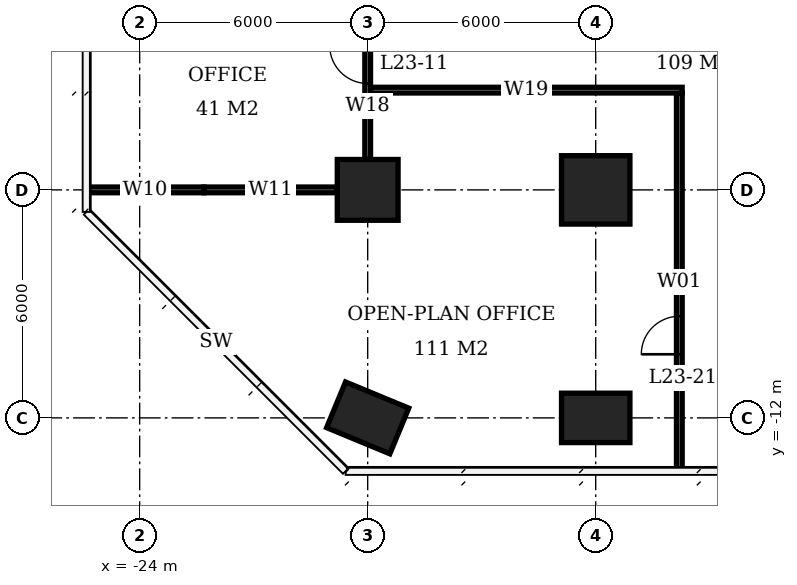
"""IFC4 building model, lengths in metres.
Left out: names, types, materials, properties, quantities, classifications, styles, units other than length and angle.
Written with IfcOpenShell. Run it as: python <this file> out.ifc"""

import sys

from ifc_helpers import new_model, si_unit, direction, frame, frame_2d, origin, origin_2d, place, context, subcontext, project, spatial, rectangle, extrude, element, fill, save


model = new_model("IFC4")
c1 = context("Model", 3, precision=1e-05, world=origin(), true_north=direction((0.0, 1.0)))
c2 = subcontext(c1, "Body", "Model", "MODEL_VIEW")
j1 = project(units=[si_unit("LENGTHUNIT", "METRE"), si_unit("PLANEANGLEUNIT", "RADIAN")], contexts=[c1])
p1 = place(None, origin())
s1 = spatial("IfcSite", under=j1, at=p1, CompositionType="ELEMENT")
p2 = place(p1, origin())
s2 = spatial("IfcBuilding", under=s1, at=p2, CompositionType="ELEMENT")
p3 = place(p2, frame((0.0, 0.0, 97.7)))
s3 = spatial("IfcBuildingStorey", under=s2, at=p3, CompositionType="ELEMENT", Elevation=97.7)
p4 = place(p3, frame((-18.0, -12.0, 0.0), z_axis=(0.0, 0.0, 1.0), x_axis=(-0.923879532511, 0.382683432365, 0.0)))
e1 = element("IfcColumn", 1, at=p4, inside=s3, PredefinedType="COLUMN", context=c2, shape_type="SweptSolid", body=[
    extrude(rectangle(XDim=1.8, YDim=1.3, at=origin_2d()), origin(), (0.0, 0.0, 1.0), 3.9),
])
p5 = place(p3, frame((-18.0, -6.0, 0.0), z_axis=(0.0, 0.0, 1.0), x_axis=(1.0, 0.0, 0.0)))
e2 = element("IfcColumn", 2, at=p5, inside=s3, PredefinedType="COLUMN", context=c2, shape_type="SweptSolid", body=[
    extrude(rectangle(XDim=1.6, YDim=1.6, at=origin_2d()), origin(), (0.0, 0.0, 1.0), 3.9),
])
p6 = place(p3, frame((-12.0, -12.0, 0.0), z_axis=(0.0, 0.0, 1.0), x_axis=(1.0, 0.0, 0.0)))
e3 = element("IfcColumn", 3, at=p6, inside=s3, PredefinedType="COLUMN", context=c2, shape_type="SweptSolid", body=[
    extrude(rectangle(XDim=1.8, YDim=1.3, at=origin_2d()), origin(), (0.0, 0.0, 1.0), 3.9),
])
p7 = place(p3, frame((-12.0, -6.0, 0.0), z_axis=(0.0, 0.0, 1.0), x_axis=(1.0, 0.0, 0.0)))
e4 = element("IfcColumn", 4, at=p7, inside=s3, PredefinedType="COLUMN", context=c2, shape_type="SweptSolid", body=[
    extrude(rectangle(XDim=1.8, YDim=1.8, at=origin_2d()), origin(), (0.0, 0.0, 1.0), 3.9),
])
p8 = place(p3, frame((-25.4, -6.0, 0.0), z_axis=(0.0, 0.0, 1.0), x_axis=(1.0, 0.0, 0.0)))
e5 = element("IfcWall", 5, at=p8, inside=s3, PredefinedType="PARTITIONING", context=c2, shape_type="SweptSolid", body=[
    extrude(rectangle(XDim=3.09, YDim=0.15, at=frame_2d((1.545, 0.0))), origin(), (0.0, 0.0, 1.0), 3.65),
])
p9 = place(p3, frame((-22.31, -6.0, 0.0), z_axis=(0.0, 0.0, 1.0), x_axis=(1.0, 0.0, 0.0)))
e6 = element("IfcWall", 6, at=p9, inside=s3, PredefinedType="PARTITIONING", context=c2, shape_type="SweptSolid", body=[
    extrude(rectangle(XDim=3.51, YDim=0.15, at=frame_2d((1.755, 0.0))), origin(), (0.0, 0.0, 1.0), 2.65),
])
p10 = place(p3, frame((-18.0, -5.2, 0.0), z_axis=(0.0, 0.0, 1.0), x_axis=(0.0, 1.0, 0.0)))
e7 = element("IfcWall", 7, at=p10, inside=s3, PredefinedType="PARTITIONING", context=c2, shape_type="SweptSolid", body=[
    extrude(rectangle(XDim=4.4, YDim=0.15, at=frame_2d((2.2, 0.0))), origin(), (0.0, 0.0, 1.0), 3.65),
])
p11 = place(p10, frame((2.0, 0.0, 0.0)))
e8 = element("IfcOpeningElement", 8, at=p11, cuts=e7, PredefinedType="OPENING", context=c2, shape_type="SweptSolid", body=[
    extrude(rectangle(XDim=1.0, YDim=2.1, at=frame_2d((0.5, 1.05))), frame((0.0, 0.085, 0.0), z_axis=(0.0, -1.0, 0.0), x_axis=(1.0, 0.0, 0.0)), (0.0, 0.0, 1.0), 0.17),
])
p12 = place(p3, frame((-17.925, -3.375, 0.0), z_axis=(0.0, 0.0, 1.0), x_axis=(1.0, 0.0, 0.0)))
e9 = element("IfcWall", 9, at=p12, inside=s3, PredefinedType="PARTITIONING", context=c2, shape_type="SweptSolid", body=[
    extrude(rectangle(XDim=8.2, YDim=0.15, at=frame_2d((4.1, 0.0))), origin(), (0.0, 0.0, 1.0), 3.65),
])
p13 = place(p3, frame((-9.8, -13.4, 0.0), z_axis=(0.0, 0.0, 1.0), x_axis=(0.0, 1.0, 0.0)))
e10 = element("IfcWall", 10, at=p13, inside=s3, PredefinedType="PARTITIONING", context=c2, shape_type="SweptSolid", body=[
    extrude(rectangle(XDim=9.95, YDim=0.15, at=frame_2d((4.975, 0.0))), origin(), (0.0, 0.0, 1.0), 3.65),
])
p14 = place(p13, frame((3.074, 0.0, 0.0)))
e11 = element("IfcOpeningElement", 11, at=p14, cuts=e10, PredefinedType="OPENING", context=c2, shape_type="SweptSolid", body=[
    extrude(rectangle(XDim=1.0, YDim=2.1, at=frame_2d((0.5, 1.05))), frame((0.0, 0.085, 0.0), z_axis=(0.0, -1.0, 0.0), x_axis=(1.0, 0.0, 0.0)), (0.0, 0.0, 1.0), 0.17),
])
p15 = place(p11, origin())
e12 = element("IfcDoor", 12, at=p15, inside=s3, OperationType="SINGLE_SWING_RIGHT", PredefinedType="DOOR", context=c2, shape_type="SweptSolid", body=[
    extrude(rectangle(XDim=1.0, YDim=2.1, at=frame_2d((0.5, 1.05))), frame((0.0, 0.025, 0.0), z_axis=(0.0, -1.0, 0.0), x_axis=(1.0, 0.0, 0.0)), (0.0, 0.0, 1.0), 0.05),
])
fill(e8, e12)
p16 = place(p14, origin())
e13 = element("IfcDoor", 13, at=p16, inside=s3, OperationType="SINGLE_SWING_LEFT", PredefinedType="DOOR", context=c2, shape_type="SweptSolid", body=[
    extrude(rectangle(XDim=1.0, YDim=2.1, at=frame_2d((0.5, 1.05))), frame((0.0, 0.025, 0.0), z_axis=(0.0, -1.0, 0.0), x_axis=(1.0, 0.0, 0.0)), (0.0, 0.0, 1.0), 0.05),
])
fill(e11, e13)
save(model, sys.argv[1])
